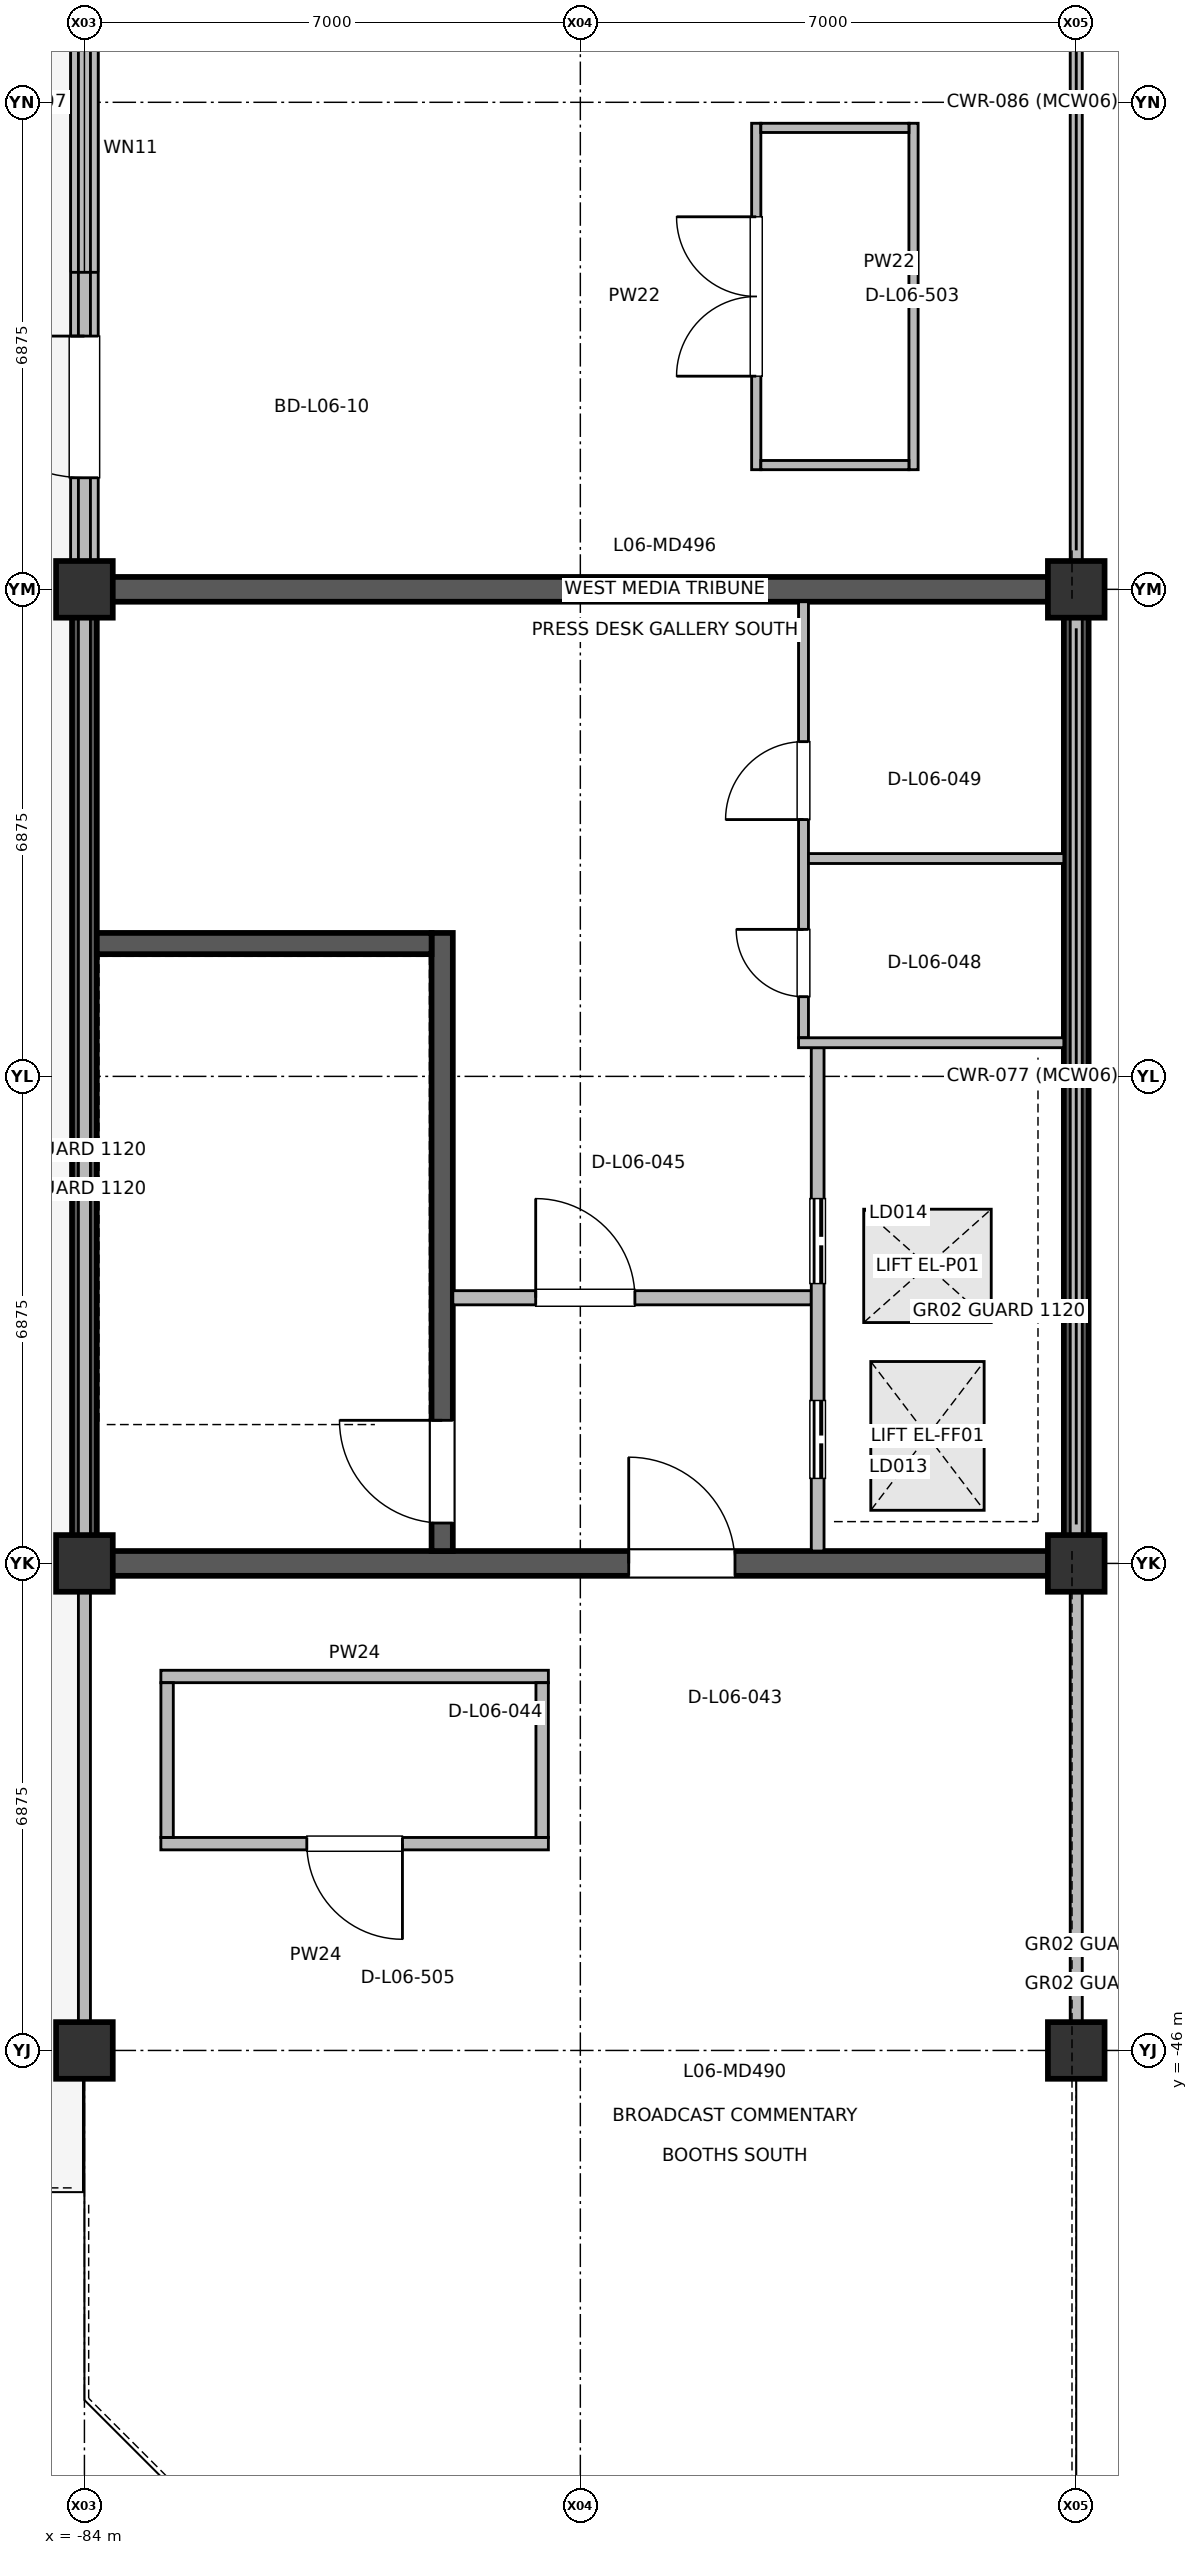
"""IFC4 building model, lengths in metres.
Left out: names, types, materials, properties, quantities, classifications, styles, units other than length and angle.
Written with IfcOpenShell. Run it as: python <this file> out.ifc"""

import sys

from ifc_helpers import new_model, si_unit, direction, frame, frame_2d, origin, origin_2d, place, context, subcontext, project, spatial, rectangle, extrude, element, fill, save


model = new_model("IFC4")
c1 = context("Model", 3, precision=1e-05, world=origin(), true_north=direction((0.0, 1.0)))
c2 = subcontext(c1, "Body", "Model", "MODEL_VIEW")
j1 = project(units=[si_unit("LENGTHUNIT", "METRE"), si_unit("PLANEANGLEUNIT", "RADIAN")], contexts=[c1])
p1 = place(None, origin())
s1 = spatial("IfcSite", under=j1, at=p1, CompositionType="ELEMENT")
p2 = place(p1, origin())
s2 = spatial("IfcBuilding", under=s1, at=p2, CompositionType="ELEMENT")
p3 = place(p2, frame((0.0, 0.0, 26.4)))
s3 = spatial("IfcBuildingStorey", under=s2, at=p3, CompositionType="ELEMENT", Elevation=26.4)
for number, where, z_axis, x_axis in (
    (1, (-84.0, -46.0, 0.0), (0.0, 0.0, 1.0), (1.0, 0.0, 0.0)),
    (2, (-84.0, -39.125, 0.0), (0.0, 0.0, 1.0), (1.0, 0.0, 0.0)),
    (3, (-84.0, -25.375, 0.0), (0.0, 0.0, 1.0), (1.0, 0.0, 0.0)),
    (4, (-70.0, -46.0, 0.0), (0.0, 0.0, 1.0), (1.0, 0.0, 0.0)),
    (5, (-70.0, -39.125, 0.0), (0.0, 0.0, 1.0), (1.0, 0.0, 0.0)),
    (6, (-70.0, -25.375, 0.0), (0.0, 0.0, 1.0), (1.0, 0.0, 0.0)),
):
    element("IfcColumn", number, at=place(p3, frame(where, z_axis=z_axis, x_axis=x_axis)), inside=s3, PredefinedType="COLUMN", context=c2, shape_type="SweptSolid", body=[
        extrude(rectangle(XDim=0.8, YDim=0.8, at=origin_2d()), origin(), (0.0, 0.0, 1.0), 4.965),
    ])
for number, where, z_axis, x_axis in (
    (7, (-84.0, -38.95, 0.0), (0.0, 0.0, 1.0), (0.0, 1.0, 0.0)),
    (8, (-70.0, -38.95, 0.0), (0.0, 0.0, 1.0), (0.0, 1.0, 0.0)),
):
    element("IfcWall", number, at=place(p3, frame(where, z_axis=z_axis, x_axis=x_axis)), inside=s3, PredefinedType="SHEAR", context=c2, shape_type="SweptSolid", body=[
        extrude(rectangle(XDim=13.4, YDim=0.35, at=frame_2d((6.7, 0.0))), origin(), (0.0, 0.0, 1.0), 4.965),
    ])
p4 = place(p3, frame((-83.825, -39.125, 0.0), z_axis=(0.0, 0.0, 1.0), x_axis=(1.0, 0.0, 0.0)))
e9 = element("IfcWall", 9, at=p4, inside=s3, PredefinedType="SHEAR", context=c2, shape_type="SweptSolid", body=[
    extrude(rectangle(XDim=13.65, YDim=0.35, at=frame_2d((6.825, 0.0))), origin(), (0.0, 0.0, 1.0), 4.965),
])
p5 = place(p4, frame((7.508, 0.0, 0.0)))
e10 = element("IfcOpeningElement", 10, at=p5, cuts=e9, PredefinedType="OPENING", context=c2, shape_type="SweptSolid", body=[
    extrude(rectangle(XDim=1.5, YDim=2.2, at=frame_2d((0.75, 1.1))), frame((0.0, 0.185, 0.0), z_axis=(0.0, -1.0, 0.0), x_axis=(1.0, 0.0, 0.0)), (0.0, 0.0, 1.0), 0.37),
])
p6 = place(p3, frame((-83.825, -25.375, 0.0), z_axis=(0.0, 0.0, 1.0), x_axis=(1.0, 0.0, 0.0)))
e11 = element("IfcWall", 11, at=p6, inside=s3, PredefinedType="SHEAR", context=c2, shape_type="SweptSolid", body=[
    extrude(rectangle(XDim=13.65, YDim=0.35, at=frame_2d((6.825, 0.0))), origin(), (0.0, 0.0, 1.0), 4.965),
])
p7 = place(p3, frame((-84.0, -25.0, 0.0), z_axis=(0.0, 0.0, 1.0), x_axis=(0.0, 1.0, 0.0)))
e12 = element("IfcWall", 12, at=p7, inside=s3, PredefinedType="SOLIDWALL", context=c2, shape_type="SweptSolid", body=[
    extrude(rectangle(XDim=13.0, YDim=0.39, at=frame_2d((6.5, 0.0))), origin(), (0.0, 0.0, 1.0), 3.14),
])
p8 = place(p7, frame((1.2, 0.0, 0.0)))
e13 = element("IfcOpeningElement", 13, at=p8, cuts=e12, PredefinedType="OPENING", context=c2, shape_type="SweptSolid", body=[
    extrude(rectangle(XDim=2.0, YDim=2.4, at=frame_2d((1.0, 1.2))), frame((0.0, 0.205, 0.0), z_axis=(0.0, -1.0, 0.0), x_axis=(1.0, 0.0, 0.0)), (0.0, 0.0, 1.0), 0.41),
])
p9 = place(p7, frame((4.1, 0.0, 0.9)))
e14 = element("IfcOpeningElement", 14, at=p9, cuts=e12, PredefinedType="OPENING", context=c2, shape_type="SweptSolid", body=[
    extrude(rectangle(XDim=3.5, YDim=2.25, at=frame_2d((1.75, 1.125))), frame((0.0, 0.205, 0.0), z_axis=(0.0, -1.0, 0.0), x_axis=(1.0, 0.0, 0.0)), (0.0, 0.0, 1.0), 0.41),
])
p10 = place(p7, frame((8.45, 0.0, 0.9)))
e15 = element("IfcOpeningElement", 15, at=p10, cuts=e12, PredefinedType="OPENING", context=c2, shape_type="SweptSolid", body=[
    extrude(rectangle(XDim=2.0, YDim=1.4, at=frame_2d((1.0, 0.7))), frame((0.0, 0.205, 0.0), z_axis=(0.0, -1.0, 0.0), x_axis=(1.0, 0.0, 0.0)), (0.0, 0.0, 1.0), 0.41),
])
for number, where, z_axis, x_axis in (
    (16, (-84.0, -45.8, 5.2), (0.0, 0.0, 1.0), (0.0, 1.0, 0.0)),
    (17, (-70.0, -45.8, 5.2), (0.0, 0.0, 1.0), (0.0, 1.0, 0.0)),
):
    element("IfcWall", number, at=place(p3, frame(where, z_axis=z_axis, x_axis=x_axis)), inside=s3, PredefinedType="PARAPET", context=c2, shape_type="SweptSolid", body=[
        extrude(rectangle(XDim=89.0, YDim=0.17, at=frame_2d((44.5, 0.0))), origin(), (0.0, 0.0, 1.0), 1.2),
    ])
p11 = place(p3, frame((-78.95, -38.95, 0.0), z_axis=(0.0, 0.0, 1.0), x_axis=(0.0, 1.0, 0.0)))
e18 = element("IfcWall", 18, at=p11, inside=s3, PredefinedType="SHEAR", context=c2, shape_type="SweptSolid", body=[
    extrude(rectangle(XDim=8.725, YDim=0.3, at=frame_2d((4.362, 0.0))), origin(), (0.0, 0.0, 1.0), 4.965),
])
p12 = place(p11, frame((0.395, 0.0, 0.0)))
e19 = element("IfcOpeningElement", 19, at=p12, cuts=e18, PredefinedType="OPENING", context=c2, shape_type="SweptSolid", body=[
    extrude(rectangle(XDim=1.45, YDim=2.2, at=frame_2d((0.725, 1.1))), frame((0.0, 0.16, 0.0), z_axis=(0.0, -1.0, 0.0), x_axis=(1.0, 0.0, 0.0)), (0.0, 0.0, 1.0), 0.32),
])
p13 = place(p3, frame((-78.8, -35.375, 0.0), z_axis=(0.0, 0.0, 1.0), x_axis=(1.0, 0.0, 0.0)))
e20 = element("IfcWall", 20, at=p13, inside=s3, PredefinedType="PARTITIONING", context=c2, shape_type="SweptSolid", body=[
    extrude(rectangle(XDim=5.06, YDim=0.2, at=frame_2d((2.53, 0.0))), origin(), (0.0, 0.0, 1.0), 4.22),
])
p14 = place(p13, frame((1.17, 0.0, 0.0)))
e21 = element("IfcOpeningElement", 21, at=p14, cuts=e20, PredefinedType="OPENING", context=c2, shape_type="SweptSolid", body=[
    extrude(rectangle(XDim=1.4, YDim=2.2, at=frame_2d((0.7, 1.1))), frame((0.0, 0.11, 0.0), z_axis=(0.0, -1.0, 0.0), x_axis=(1.0, 0.0, 0.0)), (0.0, 0.0, 1.0), 0.22),
])
p15 = place(p3, frame((-73.65, -38.95, 0.0), z_axis=(0.0, 0.0, 1.0), x_axis=(0.0, 1.0, 0.0)))
e22 = element("IfcWall", 22, at=p15, inside=s3, PredefinedType="PARTITIONING", context=c2, shape_type="SweptSolid", body=[
    extrude(rectangle(XDim=7.105, YDim=0.18, at=frame_2d((3.552, 0.0))), origin(), (0.0, 0.0, 1.0), 4.22),
])
p16 = place(p15, frame((1.025, 0.0, 0.0)))
e23 = element("IfcOpeningElement", 23, at=p16, cuts=e22, PredefinedType="OPENING", context=c2, shape_type="SweptSolid", body=[
    extrude(rectangle(XDim=1.1, YDim=2.2, at=frame_2d((0.55, 1.1))), frame((0.0, 0.1, 0.0), z_axis=(0.0, -1.0, 0.0), x_axis=(1.0, 0.0, 0.0)), (0.0, 0.0, 1.0), 0.2),
])
p17 = place(p15, frame((3.775, 0.0, 0.0)))
e24 = element("IfcOpeningElement", 24, at=p17, cuts=e22, PredefinedType="OPENING", context=c2, shape_type="SweptSolid", body=[
    extrude(rectangle(XDim=1.2, YDim=2.25, at=frame_2d((0.6, 1.125))), frame((0.0, 0.1, 0.0), z_axis=(0.0, -1.0, 0.0), x_axis=(1.0, 0.0, 0.0)), (0.0, 0.0, 1.0), 0.2),
])
p18 = place(p3, frame((-73.85, -31.705, 0.0), z_axis=(0.0, 0.0, 1.0), x_axis=(0.0, 1.0, 0.0)))
e25 = element("IfcWall", 25, at=p18, inside=s3, PredefinedType="PARTITIONING", context=c2, shape_type="SweptSolid", body=[
    extrude(rectangle(XDim=6.155, YDim=0.14, at=frame_2d((3.078, 0.0))), origin(), (0.0, 0.0, 1.0), 4.22),
])
p19 = place(p18, frame((0.58, 0.0, 0.0)))
e26 = element("IfcOpeningElement", 26, at=p19, cuts=e25, PredefinedType="OPENING", context=c2, shape_type="SweptSolid", body=[
    extrude(rectangle(XDim=0.95, YDim=2.15, at=frame_2d((0.475, 1.075))), frame((0.0, 0.08, 0.0), z_axis=(0.0, -1.0, 0.0), x_axis=(1.0, 0.0, 0.0)), (0.0, 0.0, 1.0), 0.16),
])
p20 = place(p18, frame((3.08, 0.0, 0.0)))
e27 = element("IfcOpeningElement", 27, at=p20, cuts=e25, PredefinedType="OPENING", context=c2, shape_type="SweptSolid", body=[
    extrude(rectangle(XDim=1.1, YDim=2.15, at=frame_2d((0.55, 1.075))), frame((0.0, 0.08, 0.0), z_axis=(0.0, -1.0, 0.0), x_axis=(1.0, 0.0, 0.0)), (0.0, 0.0, 1.0), 0.16),
])
p21 = place(p3, frame((-74.517, -23.686, 0.0), z_axis=(0.0, 0.0, 1.0), x_axis=(0.0, 1.0, 0.0)))
e28 = element("IfcWall", 28, at=p21, inside=s3, PredefinedType="PARTITIONING", context=c2, shape_type="SweptSolid", body=[
    extrude(rectangle(XDim=4.89, YDim=0.13, at=frame_2d((2.445, 0.0))), origin(), (0.0, 0.0, 1.0), 4.22),
])
p22 = place(p21, frame((1.32, 0.0, 0.0)))
e29 = element("IfcOpeningElement", 29, at=p22, cuts=e28, PredefinedType="OPENING", context=c2, shape_type="SweptSolid", body=[
    extrude(rectangle(XDim=2.25, YDim=2.45, at=frame_2d((1.125, 1.225))), frame((0.0, 0.075, 0.0), z_axis=(0.0, -1.0, 0.0), x_axis=(1.0, 0.0, 0.0)), (0.0, 0.0, 1.0), 0.15),
])
p23 = place(p3, frame((-77.451, -43.081, 0.0), z_axis=(0.0, 0.0, 1.0), x_axis=(-1.0, 0.0, 0.0)))
e30 = element("IfcWall", 30, at=p23, inside=s3, PredefinedType="PARTITIONING", context=c2, shape_type="SweptSolid", body=[
    extrude(rectangle(XDim=5.47, YDim=0.175, at=frame_2d((2.735, 0.0))), origin(), (0.0, 0.0, 1.0), 4.22),
])
p24 = place(p23, frame((2.06, 0.0, 0.0)))
e31 = element("IfcOpeningElement", 31, at=p24, cuts=e30, PredefinedType="OPENING", context=c2, shape_type="SweptSolid", body=[
    extrude(rectangle(XDim=1.35, YDim=2.2, at=frame_2d((0.675, 1.1))), frame((0.0, 0.097, 0.0), z_axis=(0.0, -1.0, 0.0), x_axis=(1.0, 0.0, 0.0)), (0.0, 0.0, 1.0), 0.195),
])
p25 = place(p3, frame((-73.92, -31.775, 0.0), z_axis=(0.0, 0.0, 1.0), x_axis=(1.0, 0.0, 0.0)))
e32 = element("IfcWall", 32, at=p25, inside=s3, PredefinedType="PARTITIONING", context=c2, shape_type="SweptSolid", body=[
    extrude(rectangle(XDim=3.745, YDim=0.14, at=frame_2d((1.873, 0.0))), origin(), (0.0, 0.0, 1.0), 4.22),
])
p26 = place(p3, frame((-73.78, -29.175, 0.0), z_axis=(0.0, 0.0, 1.0), x_axis=(1.0, 0.0, 0.0)))
e33 = element("IfcWall", 33, at=p26, inside=s3, PredefinedType="PARTITIONING", context=c2, shape_type="SweptSolid", body=[
    extrude(rectangle(XDim=3.605, YDim=0.14, at=frame_2d((1.802, 0.0))), origin(), (0.0, 0.0, 1.0), 4.22),
])
p27 = place(p3, frame((-72.297, -23.686, 0.0), z_axis=(0.0, 0.0, 1.0), x_axis=(0.0, 1.0, 0.0)))
e34 = element("IfcWall", 34, at=p27, inside=s3, PredefinedType="PARTITIONING", context=c2, shape_type="SweptSolid", body=[
    extrude(rectangle(XDim=4.89, YDim=0.13, at=frame_2d((2.445, 0.0))), origin(), (0.0, 0.0, 1.0), 4.22),
])
for number, where, z_axis, x_axis in (
    (35, (-74.452, -23.621, 0.0), (0.0, 0.0, 1.0), (1.0, 0.0, 0.0)),
    (36, (-74.452, -18.861, 0.0), (0.0, 0.0, 1.0), (1.0, 0.0, 0.0)),
):
    element("IfcWall", number, at=place(p3, frame(where, z_axis=z_axis, x_axis=x_axis)), inside=s3, PredefinedType="PARTITIONING", context=c2, shape_type="SweptSolid", body=[
        extrude(rectangle(XDim=2.09, YDim=0.13, at=frame_2d((1.045, 0.0))), origin(), (0.0, 0.0, 1.0), 4.22),
    ])
p28 = place(p3, frame((-82.921, -40.721, 0.0), z_axis=(0.0, 0.0, 1.0), x_axis=(1.0, 0.0, 0.0)))
e37 = element("IfcWall", 37, at=p28, inside=s3, PredefinedType="PARTITIONING", context=c2, shape_type="SweptSolid", body=[
    extrude(rectangle(XDim=5.47, YDim=0.175, at=frame_2d((2.735, 0.0))), origin(), (0.0, 0.0, 1.0), 4.22),
])
for number, where, z_axis, x_axis in (
    (38, (-82.833, -42.993, 0.0), (0.0, 0.0, 1.0), (0.0, 1.0, 0.0)),
    (39, (-77.539, -42.993, 0.0), (0.0, 0.0, 1.0), (0.0, 1.0, 0.0)),
):
    element("IfcWall", number, at=place(p3, frame(where, z_axis=z_axis, x_axis=x_axis)), inside=s3, PredefinedType="PARTITIONING", context=c2, shape_type="SweptSolid", body=[
        extrude(rectangle(XDim=2.184, YDim=0.175, at=frame_2d((1.092, 0.0))), origin(), (0.0, 0.0, 1.0), 4.22),
    ])
p29 = place(p3, frame((-83.825, -30.375, 0.0), z_axis=(0.0, 0.0, 1.0), x_axis=(1.0, 0.0, 0.0)))
e40 = element("IfcWall", 40, at=p29, inside=s3, PredefinedType="SHEAR", context=c2, shape_type="SweptSolid", body=[
    extrude(rectangle(XDim=4.725, YDim=0.3, at=frame_2d((2.362, 0.0))), origin(), (0.0, 0.0, 1.0), 4.965),
])
p30 = place(p8, origin())
e41 = element("IfcDoor", 41, at=p30, inside=s3, OperationType="SINGLE_SWING_RIGHT", PredefinedType="DOOR", context=c2, shape_type="SweptSolid", body=[
    extrude(rectangle(XDim=2.0, YDim=2.4, at=frame_2d((1.0, 1.2))), frame((0.0, 0.025, 0.0), z_axis=(0.0, -1.0, 0.0), x_axis=(1.0, 0.0, 0.0)), (0.0, 0.0, 1.0), 0.05),
])
fill(e13, e41)
p31 = place(p9, origin())
e42 = element("IfcWindow", 42, at=p31, inside=s3, PartitioningType="SINGLE_PANEL", PredefinedType="WINDOW", context=c2, shape_type="SweptSolid", body=[
    extrude(rectangle(XDim=3.5, YDim=2.25, at=frame_2d((1.75, 1.125))), frame((0.0, 0.03, 0.0), z_axis=(0.0, -1.0, 0.0), x_axis=(1.0, 0.0, 0.0)), (0.0, 0.0, 1.0), 0.06),
])
fill(e14, e42)
p32 = place(p5, origin())
e43 = element("IfcDoor", 43, at=p32, inside=s3, OperationType="SINGLE_SWING_LEFT", PredefinedType="DOOR", context=c2, shape_type="SweptSolid", body=[
    extrude(rectangle(XDim=1.5, YDim=2.2, at=frame_2d((0.75, 1.1))), frame((0.0, 0.025, 0.0), z_axis=(0.0, -1.0, 0.0), x_axis=(1.0, 0.0, 0.0)), (0.0, 0.0, 1.0), 0.05),
])
fill(e10, e43)
p33 = place(p12, origin())
e44 = element("IfcDoor", 44, at=p33, inside=s3, OperationType="SINGLE_SWING_RIGHT", PredefinedType="DOOR", context=c2, shape_type="SweptSolid", body=[
    extrude(rectangle(XDim=1.45, YDim=2.2, at=frame_2d((0.725, 1.1))), frame((0.0, 0.025, 0.0), z_axis=(0.0, -1.0, 0.0), x_axis=(1.0, 0.0, 0.0)), (0.0, 0.0, 1.0), 0.05),
])
fill(e19, e44)
p34 = place(p14, origin())
e45 = element("IfcDoor", 45, at=p34, inside=s3, OperationType="SINGLE_SWING_LEFT", PredefinedType="DOOR", context=c2, shape_type="SweptSolid", body=[
    extrude(rectangle(XDim=1.4, YDim=2.2, at=frame_2d((0.7, 1.1))), frame((0.0, 0.025, 0.0), z_axis=(0.0, -1.0, 0.0), x_axis=(1.0, 0.0, 0.0)), (0.0, 0.0, 1.0), 0.05),
])
fill(e21, e45)
p35 = place(p16, origin())
e46 = element("IfcDoor", 46, at=p35, inside=s3, OperationType="DOUBLE_DOOR_SLIDING", PredefinedType="DOOR", context=c2, shape_type="SweptSolid", body=[
    extrude(rectangle(XDim=1.1, YDim=2.2, at=frame_2d((0.55, 1.1))), frame((0.0, 0.025, 0.0), z_axis=(0.0, -1.0, 0.0), x_axis=(1.0, 0.0, 0.0)), (0.0, 0.0, 1.0), 0.05),
])
fill(e23, e46)
p36 = place(p17, origin())
e47 = element("IfcDoor", 47, at=p36, inside=s3, OperationType="DOUBLE_DOOR_SLIDING", PredefinedType="DOOR", context=c2, shape_type="SweptSolid", body=[
    extrude(rectangle(XDim=1.2, YDim=2.25, at=frame_2d((0.6, 1.125))), frame((0.0, 0.025, 0.0), z_axis=(0.0, -1.0, 0.0), x_axis=(1.0, 0.0, 0.0)), (0.0, 0.0, 1.0), 0.05),
])
fill(e24, e47)
p37 = place(p19, origin())
e48 = element("IfcDoor", 48, at=p37, inside=s3, OperationType="SINGLE_SWING_RIGHT", PredefinedType="DOOR", context=c2, shape_type="SweptSolid", body=[
    extrude(rectangle(XDim=0.95, YDim=2.15, at=frame_2d((0.475, 1.075))), frame((0.0, 0.025, 0.0), z_axis=(0.0, -1.0, 0.0), x_axis=(1.0, 0.0, 0.0)), (0.0, 0.0, 1.0), 0.05),
])
fill(e26, e48)
p38 = place(p20, origin())
e49 = element("IfcDoor", 49, at=p38, inside=s3, OperationType="SINGLE_SWING_LEFT", PredefinedType="DOOR", context=c2, shape_type="SweptSolid", body=[
    extrude(rectangle(XDim=1.1, YDim=2.15, at=frame_2d((0.55, 1.075))), frame((0.0, 0.025, 0.0), z_axis=(0.0, -1.0, 0.0), x_axis=(1.0, 0.0, 0.0)), (0.0, 0.0, 1.0), 0.05),
])
fill(e27, e49)
p39 = place(p22, origin())
e50 = element("IfcDoor", 50, at=p39, inside=s3, OperationType="DOUBLE_DOOR_SINGLE_SWING", PredefinedType="DOOR", context=c2, shape_type="SweptSolid", body=[
    extrude(rectangle(XDim=2.25, YDim=2.45, at=frame_2d((1.125, 1.225))), frame((0.0, 0.025, 0.0), z_axis=(0.0, -1.0, 0.0), x_axis=(1.0, 0.0, 0.0)), (0.0, 0.0, 1.0), 0.05),
])
fill(e29, e50)
p40 = place(p24, origin())
e51 = element("IfcDoor", 51, at=p40, inside=s3, OperationType="SINGLE_SWING_LEFT", PredefinedType="DOOR", context=c2, shape_type="SweptSolid", body=[
    extrude(rectangle(XDim=1.35, YDim=2.2, at=frame_2d((0.675, 1.1))), frame((0.0, 0.025, 0.0), z_axis=(0.0, -1.0, 0.0), x_axis=(1.0, 0.0, 0.0)), (0.0, 0.0, 1.0), 0.05),
])
fill(e31, e51)
save(model, sys.argv[1])
